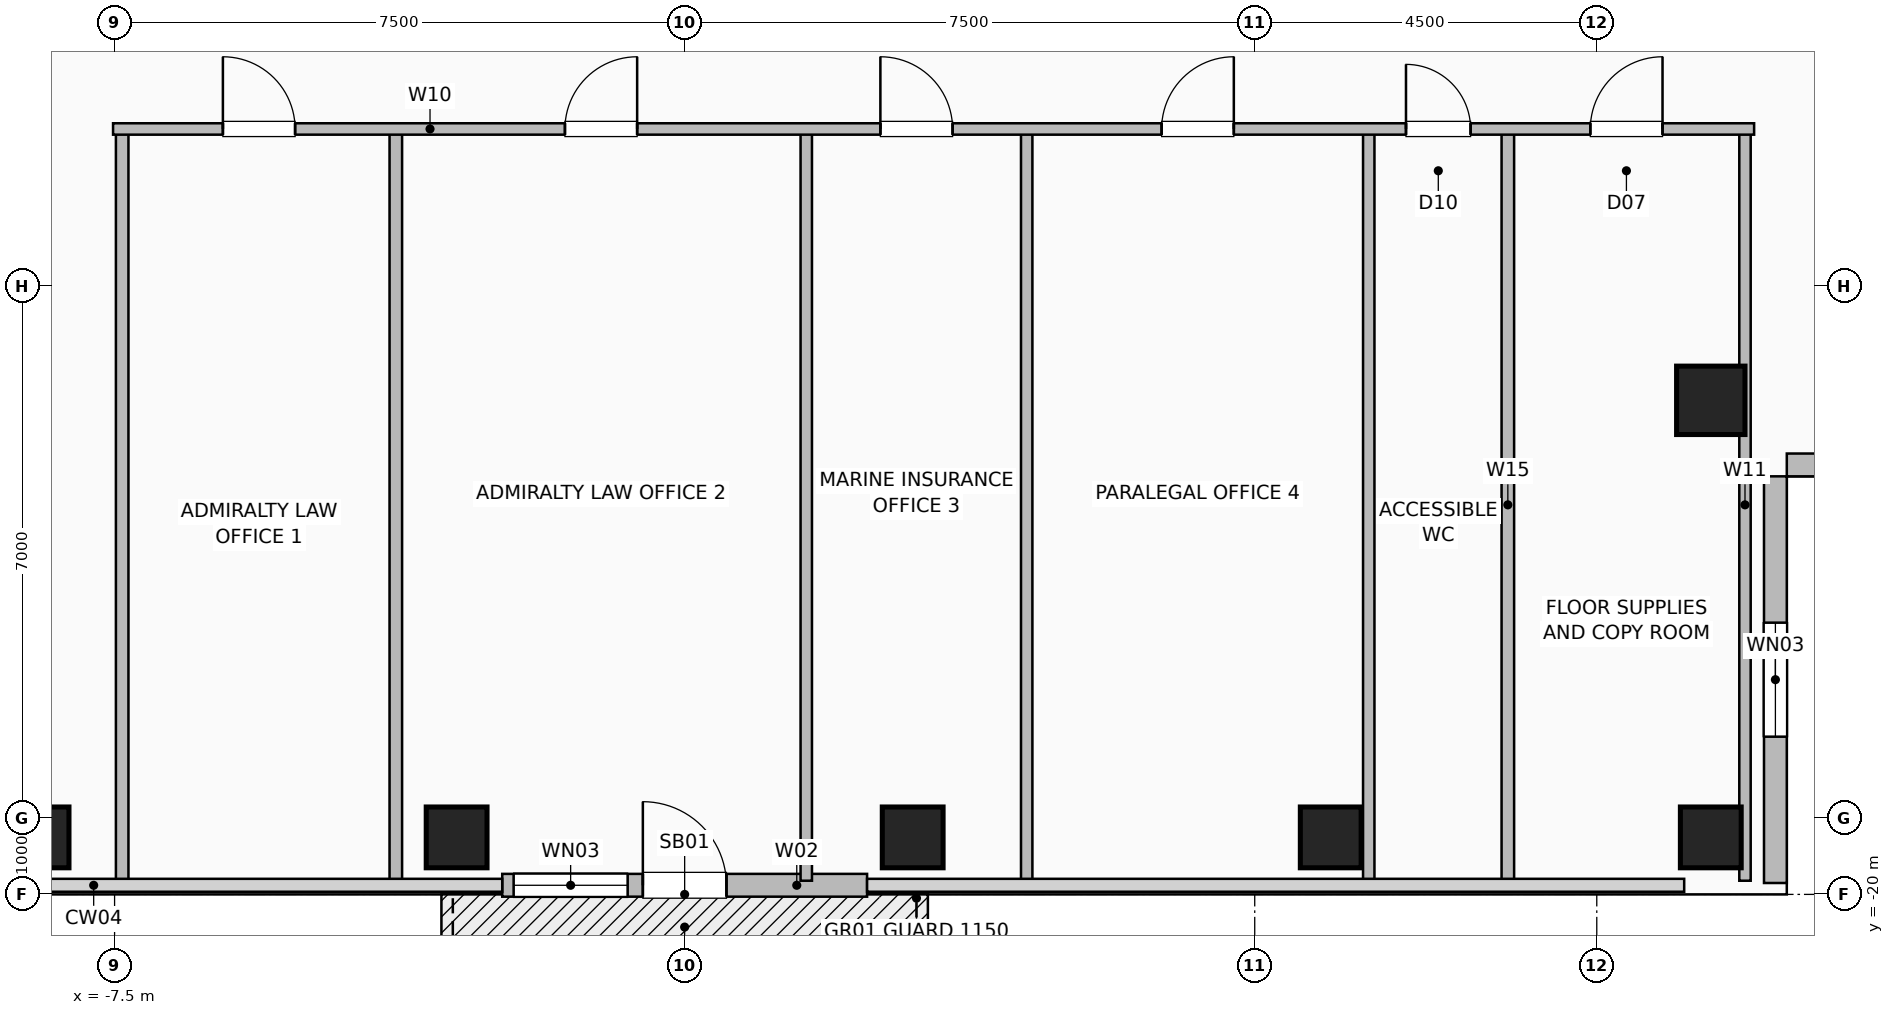
"""IFC4 building model, lengths in metres.
Left out: names, types, materials, properties, quantities, classifications, styles, units other than length and angle.
Written with IfcOpenShell. Run it as: python <this file> out.ifc"""

import sys

from ifc_helpers import new_model, si_unit, direction, frame, frame_2d, origin, origin_2d, place, context, subcontext, project, spatial, rectangle, hollow_rectangle, extrude, element, fill, save


model = new_model("IFC4")
c1 = context("Model", 3, precision=1e-05, world=origin(), true_north=direction((0.0, 1.0)))
c2 = subcontext(c1, "Body", "Model", "MODEL_VIEW")
j1 = project(units=[si_unit("LENGTHUNIT", "METRE"), si_unit("PLANEANGLEUNIT", "RADIAN")], contexts=[c1])
p1 = place(None, origin())
s1 = spatial("IfcSite", under=j1, at=p1, CompositionType="ELEMENT")
p2 = place(p1, origin())
s2 = spatial("IfcBuilding", under=s1, at=p2, CompositionType="ELEMENT")
p3 = place(p2, frame((0.0, 0.0, 177.0)))
s3 = spatial("IfcBuildingStorey", under=s2, at=p3, CompositionType="ELEMENT", Elevation=177.0)
for number, where, z_axis, x_axis in (
    (1, (-8.5, -19.25, 0.0), (0.0, 0.0, 1.0), (1.0, 0.0, 0.0)),
    (2, (-3.0, -19.25, 0.0), (0.0, 0.0, 1.0), (1.0, 0.0, 0.0)),
    (3, (3.0, -19.25, 0.0), (0.0, 0.0, 1.0), (1.0, 0.0, 0.0)),
    (4, (8.5, -19.25, 0.0), (0.0, 0.0, 1.0), (1.0, 0.0, 0.0)),
    (5, (13.5, -19.25, 0.0), (0.0, 0.0, 1.0), (1.0, 0.0, 0.0)),
):
    element("IfcColumn", number, at=place(p3, frame(where, z_axis=z_axis, x_axis=x_axis)), inside=s3, PredefinedType="COLUMN", context=c2, shape_type="SweptSolid", body=[
        extrude(hollow_rectangle(XDim=0.8, YDim=0.8, WallThickness=0.04, at=origin_2d()), origin(), (0.0, 0.0, 1.0), 3.6),
    ])
p4 = place(p3, frame((13.5, -13.5, 0.0), z_axis=(0.0, 0.0, 1.0), x_axis=(1.0, 0.0, 0.0)))
e6 = element("IfcColumn", 6, at=p4, inside=s3, PredefinedType="COLUMN", context=c2, shape_type="SweptSolid", body=[
    extrude(hollow_rectangle(XDim=0.9, YDim=0.9, WallThickness=0.045, at=origin_2d()), origin(), (0.0, 0.0, 1.0), 3.6),
])
p5 = place(p3, frame((-2.4, -19.88, 0.0), z_axis=(0.0, 0.0, 1.0), x_axis=(1.0, 0.0, 0.0)))
e7 = element("IfcWall", 7, at=p5, inside=s3, PredefinedType="SOLIDWALL", context=c2, shape_type="SweptSolid", body=[
    extrude(rectangle(XDim=4.8, YDim=0.3, at=frame_2d((2.4, 0.0))), origin(), (0.0, 0.0, 1.0), 3.36),
])
p6 = place(p5, frame((1.85, 0.0, 0.0)))
e8 = element("IfcOpeningElement", 8, at=p6, cuts=e7, PredefinedType="OPENING", context=c2, shape_type="SweptSolid", body=[
    extrude(rectangle(XDim=1.1, YDim=2.2, at=frame_2d((0.55, 1.1))), frame((0.0, 0.16, 0.0), z_axis=(0.0, -1.0, 0.0), x_axis=(1.0, 0.0, 0.0)), (0.0, 0.0, 1.0), 0.32),
])
p7 = place(p5, frame((0.15, 0.0, 0.85)))
e9 = element("IfcOpeningElement", 9, at=p7, cuts=e7, PredefinedType="OPENING", context=c2, shape_type="SweptSolid", body=[
    extrude(rectangle(XDim=1.5, YDim=1.8, at=frame_2d((0.75, 0.9))), frame((0.0, 0.16, 0.0), z_axis=(0.0, -1.0, 0.0), x_axis=(1.0, 0.0, 0.0)), (0.0, 0.0, 1.0), 0.32),
])
p8 = place(p3, frame((14.35, -19.85, 0.0), z_axis=(0.0, 0.0, 1.0), x_axis=(0.0, 1.0, 0.0)))
e10 = element("IfcWall", 10, at=p8, inside=s3, PredefinedType="SOLIDWALL", context=c2, shape_type="SweptSolid", body=[
    extrude(rectangle(XDim=5.35, YDim=0.3, at=frame_2d((2.675, 0.0))), origin(), (0.0, 0.0, 1.0), 3.36),
])
p9 = place(p8, frame((1.925, 0.0, 0.9)))
e11 = element("IfcOpeningElement", 11, at=p9, cuts=e10, PredefinedType="OPENING", context=c2, shape_type="SweptSolid", body=[
    extrude(rectangle(XDim=1.5, YDim=1.8, at=frame_2d((0.75, 0.9))), frame((0.0, 0.16, 0.0), z_axis=(0.0, -1.0, 0.0), x_axis=(1.0, 0.0, 0.0)), (0.0, 0.0, 1.0), 0.32),
])
p10 = place(p3, frame((19.85, -14.35, 0.0), z_axis=(0.0, 0.0, 1.0), x_axis=(-1.0, 0.0, 0.0)))
e12 = element("IfcWall", 12, at=p10, inside=s3, PredefinedType="SOLIDWALL", context=c2, shape_type="SweptSolid", body=[
    extrude(rectangle(XDim=5.35, YDim=0.3, at=frame_2d((2.675, 0.0))), origin(), (0.0, 0.0, 1.0), 3.36),
])
for number, where, z_axis, x_axis in (
    (13, (10.83, -19.82, 0.0), (0.0, 0.0, 1.0), (0.0, 1.0, 0.0)),
    (14, (-7.4, -19.82, 0.0), (0.0, 0.0, 1.0), (0.0, 1.0, 0.0)),
    (15, (-3.8, -19.82, 0.0), (0.0, 0.0, 1.0), (0.0, 1.0, 0.0)),
):
    element("IfcWall", number, at=place(p3, frame(where, z_axis=z_axis, x_axis=x_axis)), inside=s3, PredefinedType="PLUMBINGWALL", context=c2, shape_type="SweptSolid", body=[
        extrude(rectangle(XDim=9.89, YDim=0.165, at=frame_2d((4.945, 0.0))), origin(), (0.0, 0.0, 1.0), 3.36),
    ])
for number, where, z_axis, x_axis in (
    (16, (1.6, -19.82, 0.0), (0.0, 0.0, 1.0), (0.0, 1.0, 0.0)),
    (17, (4.5, -19.82, 0.0), (0.0, 0.0, 1.0), (0.0, 1.0, 0.0)),
    (18, (9.0, -19.82, 0.0), (0.0, 0.0, 1.0), (0.0, 1.0, 0.0)),
    (19, (13.95, -19.82, 0.0), (0.0, 0.0, 1.0), (0.0, 1.0, 0.0)),
):
    element("IfcWall", number, at=place(p3, frame(where, z_axis=z_axis, x_axis=x_axis)), inside=s3, PredefinedType="PARTITIONING", context=c2, shape_type="SweptSolid", body=[
        extrude(rectangle(XDim=9.89, YDim=0.15, at=frame_2d((4.945, 0.0))), origin(), (0.0, 0.0, 1.0), 3.36),
    ])
p11 = place(p3, frame((-7.52, -9.93, 0.0), z_axis=(0.0, 0.0, 1.0), x_axis=(1.0, 0.0, 0.0)))
e20 = element("IfcWall", 20, at=p11, inside=s3, PredefinedType="PARTITIONING", context=c2, shape_type="SweptSolid", body=[
    extrude(rectangle(XDim=21.59, YDim=0.15, at=frame_2d((10.795, 0.0))), origin(), (0.0, 0.0, 1.0), 3.36),
])
p12 = place(p11, frame((1.445, 0.0, 0.0)))
e21 = element("IfcOpeningElement", 21, at=p12, cuts=e20, PredefinedType="OPENING", context=c2, shape_type="SweptSolid", body=[
    extrude(rectangle(XDim=0.95, YDim=2.06, at=frame_2d((0.475, 1.03))), frame((0.0, 0.085, 0.0), z_axis=(0.0, -1.0, 0.0), x_axis=(1.0, 0.0, 0.0)), (0.0, 0.0, 1.0), 0.17),
])
p13 = place(p11, frame((5.945, 0.0, 0.0)))
e22 = element("IfcOpeningElement", 22, at=p13, cuts=e20, PredefinedType="OPENING", context=c2, shape_type="SweptSolid", body=[
    extrude(rectangle(XDim=0.95, YDim=2.06, at=frame_2d((0.475, 1.03))), frame((0.0, 0.085, 0.0), z_axis=(0.0, -1.0, 0.0), x_axis=(1.0, 0.0, 0.0)), (0.0, 0.0, 1.0), 0.17),
])
p14 = place(p11, frame((10.095, 0.0, 0.0)))
e23 = element("IfcOpeningElement", 23, at=p14, cuts=e20, PredefinedType="OPENING", context=c2, shape_type="SweptSolid", body=[
    extrude(rectangle(XDim=0.95, YDim=2.06, at=frame_2d((0.475, 1.03))), frame((0.0, 0.085, 0.0), z_axis=(0.0, -1.0, 0.0), x_axis=(1.0, 0.0, 0.0)), (0.0, 0.0, 1.0), 0.17),
])
p15 = place(p11, frame((13.795, 0.0, 0.0)))
e24 = element("IfcOpeningElement", 24, at=p15, cuts=e20, PredefinedType="OPENING", context=c2, shape_type="SweptSolid", body=[
    extrude(rectangle(XDim=0.95, YDim=2.06, at=frame_2d((0.475, 1.03))), frame((0.0, 0.085, 0.0), z_axis=(0.0, -1.0, 0.0), x_axis=(1.0, 0.0, 0.0)), (0.0, 0.0, 1.0), 0.17),
])
p16 = place(p11, frame((17.01, 0.0, 0.0)))
e25 = element("IfcOpeningElement", 25, at=p16, cuts=e20, PredefinedType="OPENING", context=c2, shape_type="SweptSolid", body=[
    extrude(rectangle(XDim=0.85, YDim=2.05, at=frame_2d((0.425, 1.025))), frame((0.0, 0.085, 0.0), z_axis=(0.0, -1.0, 0.0), x_axis=(1.0, 0.0, 0.0)), (0.0, 0.0, 1.0), 0.17),
])
p17 = place(p11, frame((19.435, 0.0, 0.0)))
e26 = element("IfcOpeningElement", 26, at=p17, cuts=e20, PredefinedType="OPENING", context=c2, shape_type="SweptSolid", body=[
    extrude(rectangle(XDim=0.95, YDim=2.06, at=frame_2d((0.475, 1.03))), frame((0.0, 0.085, 0.0), z_axis=(0.0, -1.0, 0.0), x_axis=(1.0, 0.0, 0.0)), (0.0, 0.0, 1.0), 0.17),
])
p18 = place(p6, origin())
e27 = element("IfcDoor", 27, at=p18, inside=s3, OperationType="SINGLE_SWING_LEFT", PredefinedType="DOOR", context=c2, shape_type="SweptSolid", body=[
    extrude(rectangle(XDim=1.1, YDim=2.2, at=frame_2d((0.55, 1.1))), frame((0.0, 0.025, 0.0), z_axis=(0.0, -1.0, 0.0), x_axis=(1.0, 0.0, 0.0)), (0.0, 0.0, 1.0), 0.05),
])
fill(e8, e27)
p19 = place(p7, origin())
e28 = element("IfcWindow", 28, at=p19, inside=s3, PartitioningType="SINGLE_PANEL", PredefinedType="WINDOW", context=c2, shape_type="SweptSolid", body=[
    extrude(rectangle(XDim=1.5, YDim=1.8, at=frame_2d((0.75, 0.9))), frame((0.0, 0.03, 0.0), z_axis=(0.0, -1.0, 0.0), x_axis=(1.0, 0.0, 0.0)), (0.0, 0.0, 1.0), 0.06),
])
fill(e9, e28)
p20 = place(p9, origin())
e29 = element("IfcWindow", 29, at=p20, inside=s3, PartitioningType="SINGLE_PANEL", PredefinedType="WINDOW", context=c2, shape_type="SweptSolid", body=[
    extrude(rectangle(XDim=1.5, YDim=1.8, at=frame_2d((0.75, 0.9))), frame((0.0, 0.03, 0.0), z_axis=(0.0, -1.0, 0.0), x_axis=(1.0, 0.0, 0.0)), (0.0, 0.0, 1.0), 0.06),
])
fill(e11, e29)
p21 = place(p12, origin())
e30 = element("IfcDoor", 30, at=p21, inside=s3, OperationType="SINGLE_SWING_LEFT", PredefinedType="DOOR", context=c2, shape_type="SweptSolid", body=[
    extrude(rectangle(XDim=0.95, YDim=2.06, at=frame_2d((0.475, 1.03))), frame((0.0, 0.025, 0.0), z_axis=(0.0, -1.0, 0.0), x_axis=(1.0, 0.0, 0.0)), (0.0, 0.0, 1.0), 0.05),
])
fill(e21, e30)
p22 = place(p13, origin())
e31 = element("IfcDoor", 31, at=p22, inside=s3, OperationType="SINGLE_SWING_RIGHT", PredefinedType="DOOR", context=c2, shape_type="SweptSolid", body=[
    extrude(rectangle(XDim=0.95, YDim=2.06, at=frame_2d((0.475, 1.03))), frame((0.0, 0.025, 0.0), z_axis=(0.0, -1.0, 0.0), x_axis=(1.0, 0.0, 0.0)), (0.0, 0.0, 1.0), 0.05),
])
fill(e22, e31)
p23 = place(p14, origin())
e32 = element("IfcDoor", 32, at=p23, inside=s3, OperationType="SINGLE_SWING_LEFT", PredefinedType="DOOR", context=c2, shape_type="SweptSolid", body=[
    extrude(rectangle(XDim=0.95, YDim=2.06, at=frame_2d((0.475, 1.03))), frame((0.0, 0.025, 0.0), z_axis=(0.0, -1.0, 0.0), x_axis=(1.0, 0.0, 0.0)), (0.0, 0.0, 1.0), 0.05),
])
fill(e23, e32)
p24 = place(p15, origin())
e33 = element("IfcDoor", 33, at=p24, inside=s3, OperationType="SINGLE_SWING_RIGHT", PredefinedType="DOOR", context=c2, shape_type="SweptSolid", body=[
    extrude(rectangle(XDim=0.95, YDim=2.06, at=frame_2d((0.475, 1.03))), frame((0.0, 0.025, 0.0), z_axis=(0.0, -1.0, 0.0), x_axis=(1.0, 0.0, 0.0)), (0.0, 0.0, 1.0), 0.05),
])
fill(e24, e33)
p25 = place(p16, origin())
e34 = element("IfcDoor", 34, at=p25, inside=s3, OperationType="SINGLE_SWING_LEFT", PredefinedType="DOOR", context=c2, shape_type="SweptSolid", body=[
    extrude(rectangle(XDim=0.85, YDim=2.05, at=frame_2d((0.425, 1.025))), frame((0.0, 0.025, 0.0), z_axis=(0.0, -1.0, 0.0), x_axis=(1.0, 0.0, 0.0)), (0.0, 0.0, 1.0), 0.05),
])
fill(e25, e34)
p26 = place(p17, origin())
e35 = element("IfcDoor", 35, at=p26, inside=s3, OperationType="SINGLE_SWING_RIGHT", PredefinedType="DOOR", context=c2, shape_type="SweptSolid", body=[
    extrude(rectangle(XDim=0.95, YDim=2.06, at=frame_2d((0.475, 1.03))), frame((0.0, 0.025, 0.0), z_axis=(0.0, -1.0, 0.0), x_axis=(1.0, 0.0, 0.0)), (0.0, 0.0, 1.0), 0.05),
])
fill(e26, e35)
save(model, sys.argv[1])
